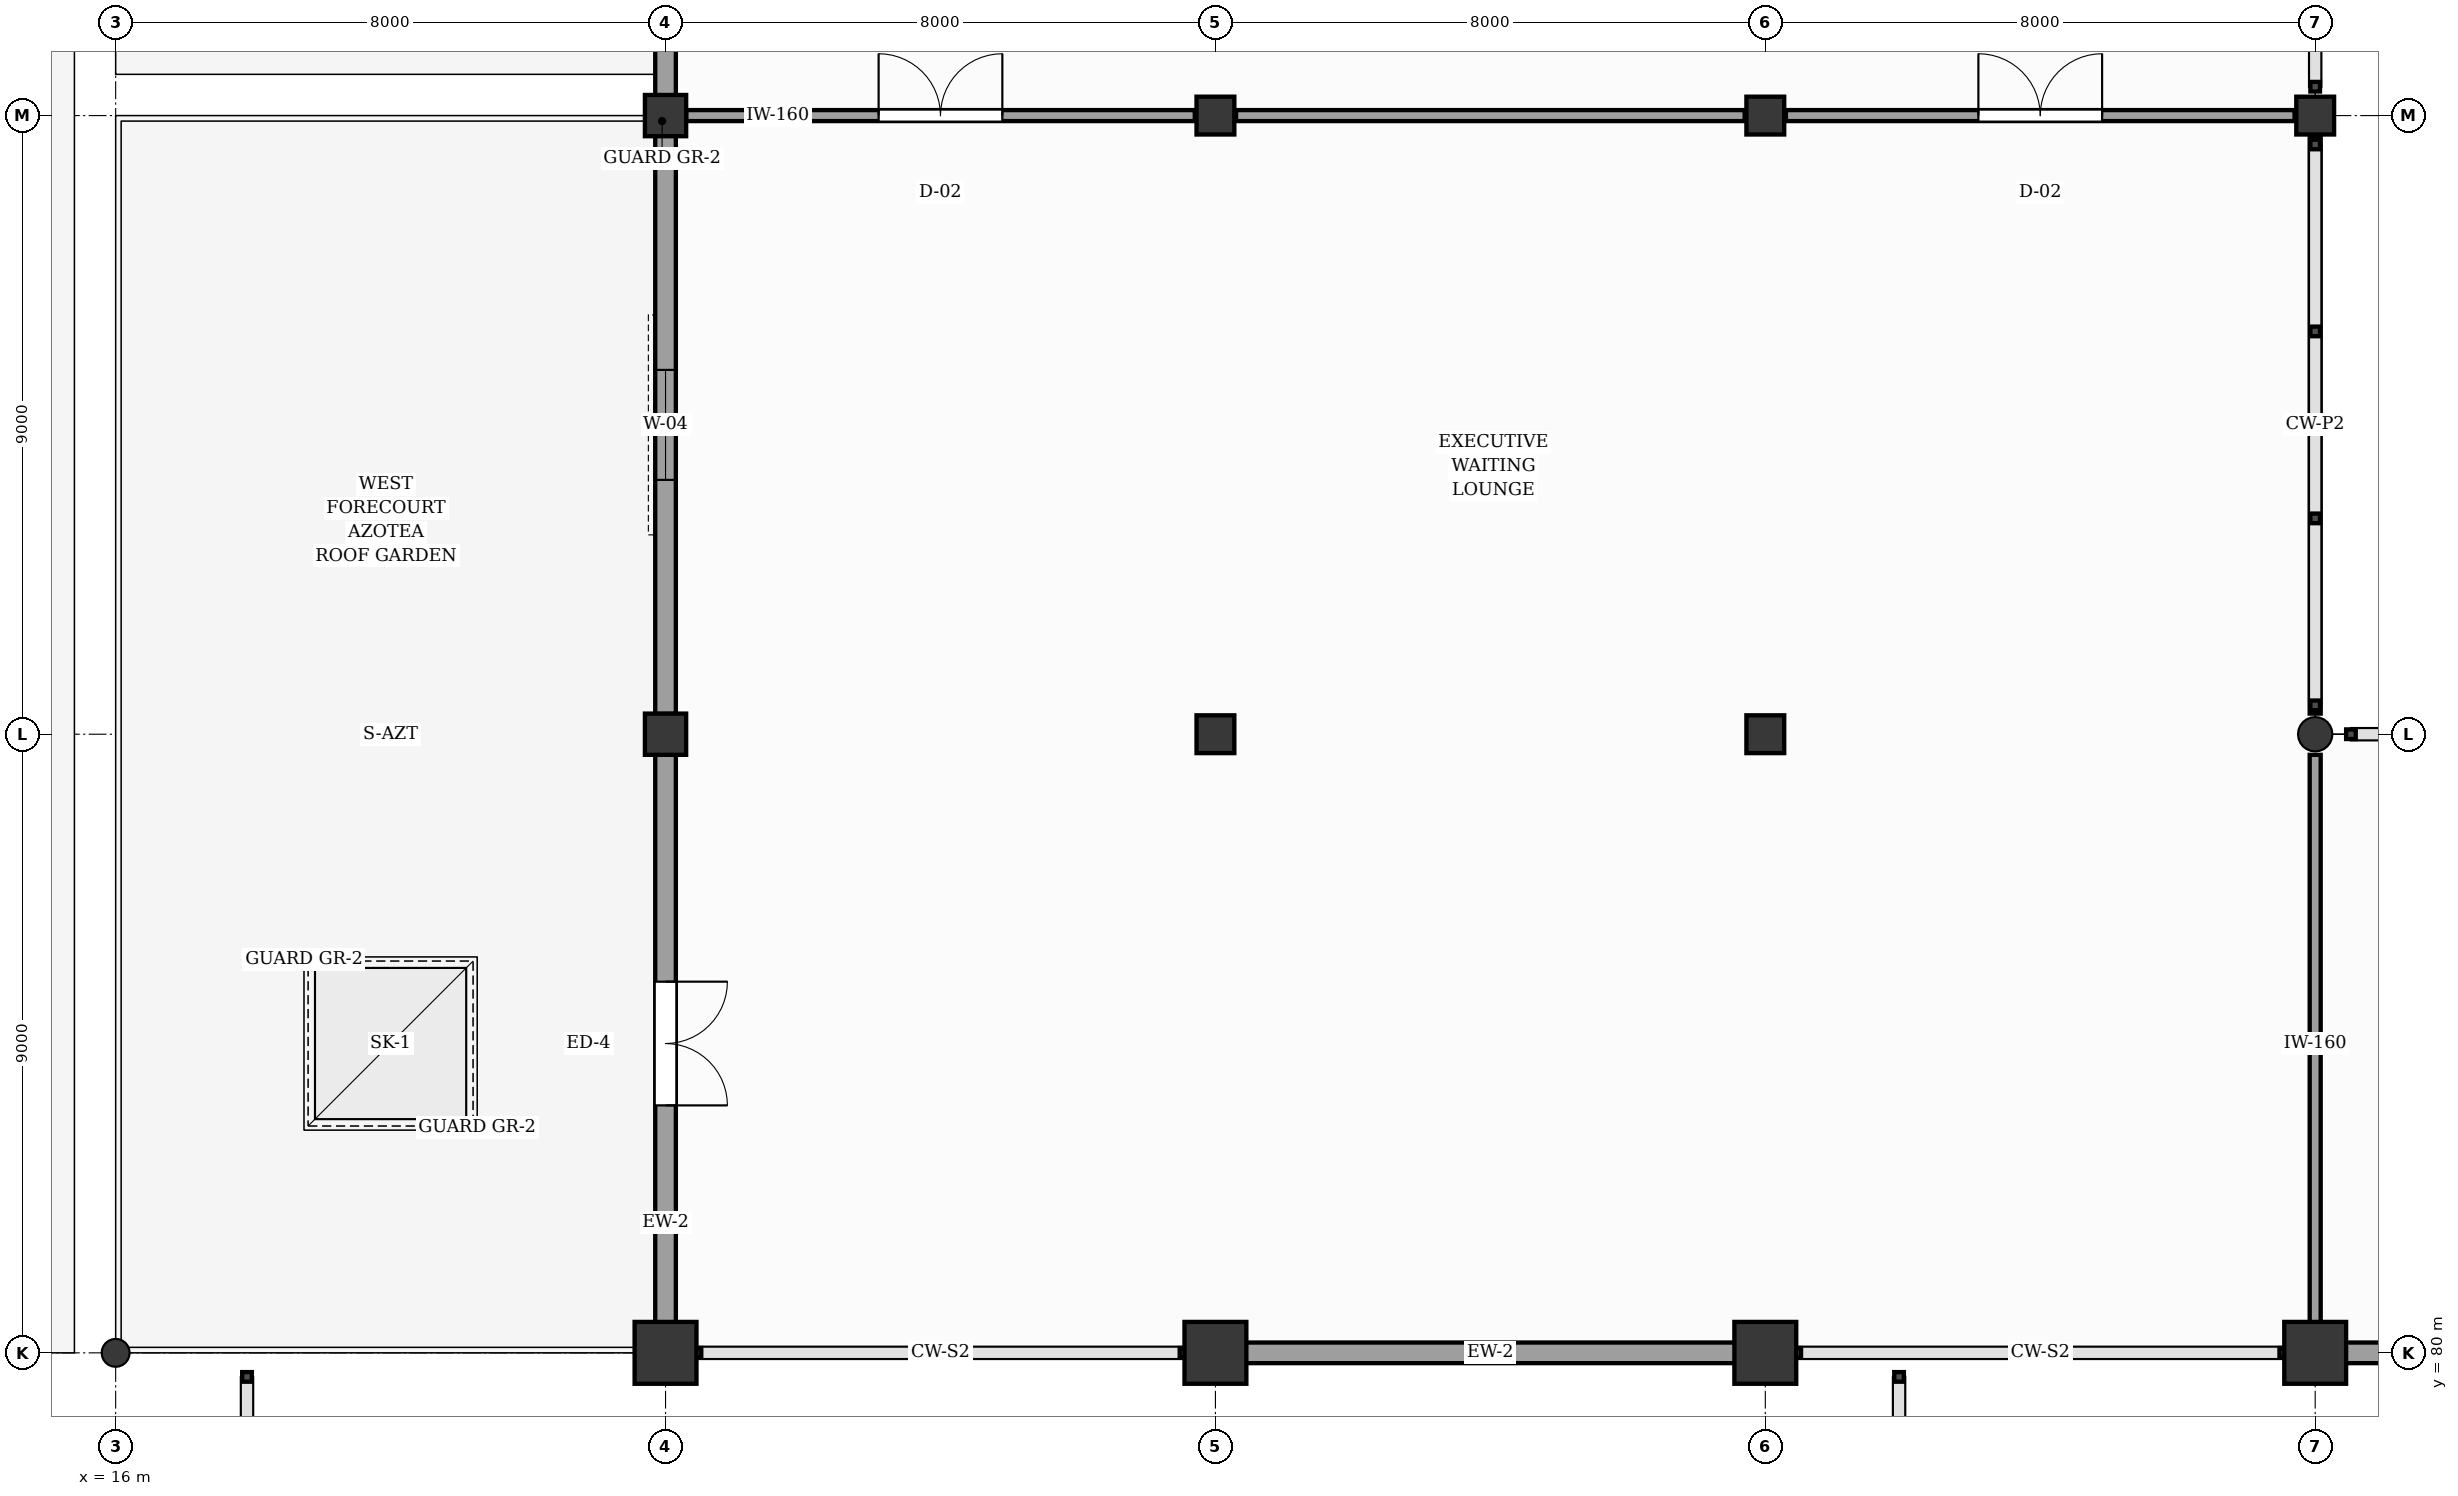
"""IFC4 building model, lengths in metres.
Left out: names, types, materials, properties, quantities, classifications, styles, units other than length and angle.
Written with IfcOpenShell. Run it as: python <this file> out.ifc"""

import sys

from ifc_helpers import new_model, si_unit, direction, frame, frame_2d, origin, origin_2d, place, context, subcontext, project, spatial, rectangle, circle, hollow_circle, extrude, element, fill, save


model = new_model("IFC4")
c1 = context("Model", 3, precision=1e-05, world=origin(), true_north=direction((0.0, 1.0)))
c2 = subcontext(c1, "Body", "Model", "MODEL_VIEW")
j1 = project(units=[si_unit("LENGTHUNIT", "METRE"), si_unit("PLANEANGLEUNIT", "RADIAN")], contexts=[c1])
p1 = place(None, origin())
s1 = spatial("IfcSite", under=j1, at=p1, CompositionType="ELEMENT")
p2 = place(p1, origin())
s2 = spatial("IfcBuilding", under=s1, at=p2, CompositionType="ELEMENT")
p3 = place(p2, frame((0.0, 0.0, 9.6)))
s3 = spatial("IfcBuildingStorey", under=s2, at=p3, CompositionType="ELEMENT", Elevation=9.6)
p4 = place(p3, frame((24.0, 80.0, 0.0), z_axis=(0.0, 0.0, 1.0), x_axis=(1.0, 0.0, 0.0)))
e1 = element("IfcColumn", 1, at=p4, inside=s3, PredefinedType="COLUMN", context=c2, shape_type="SweptSolid", body=[
    extrude(rectangle(XDim=0.9, YDim=0.9, at=origin_2d()), origin(), (0.0, 0.0, 1.0), 6.6),
])
for number, where, z_axis, x_axis in (
    (2, (24.0, 89.0, 0.0), (0.0, 0.0, 1.0), (1.0, 0.0, 0.0)),
    (3, (24.0, 98.0, 0.0), (0.0, 0.0, 1.0), (1.0, 0.0, 0.0)),
):
    element("IfcColumn", number, at=place(p3, frame(where, z_axis=z_axis, x_axis=x_axis)), inside=s3, PredefinedType="COLUMN", context=c2, shape_type="SweptSolid", body=[
        extrude(rectangle(XDim=0.6, YDim=0.6, at=origin_2d()), origin(), (0.0, 0.0, 1.0), 6.6),
    ])
p5 = place(p3, frame((32.0, 80.0, 0.0), z_axis=(0.0, 0.0, 1.0), x_axis=(1.0, 0.0, 0.0)))
e4 = element("IfcColumn", 4, at=p5, inside=s3, PredefinedType="COLUMN", context=c2, shape_type="SweptSolid", body=[
    extrude(rectangle(XDim=0.9, YDim=0.9, at=origin_2d()), origin(), (0.0, 0.0, 1.0), 6.6),
])
for number, where, z_axis, x_axis in (
    (5, (32.0, 89.0, 0.0), (0.0, 0.0, 1.0), (1.0, 0.0, 0.0)),
    (6, (32.0, 98.0, 0.0), (0.0, 0.0, 1.0), (1.0, 0.0, 0.0)),
):
    element("IfcColumn", number, at=place(p3, frame(where, z_axis=z_axis, x_axis=x_axis)), inside=s3, PredefinedType="COLUMN", context=c2, shape_type="SweptSolid", body=[
        extrude(rectangle(XDim=0.55, YDim=0.55, at=origin_2d()), origin(), (0.0, 0.0, 1.0), 6.6),
    ])
p6 = place(p3, frame((40.0, 80.0, 0.0), z_axis=(0.0, 0.0, 1.0), x_axis=(1.0, 0.0, 0.0)))
e7 = element("IfcColumn", 7, at=p6, inside=s3, PredefinedType="COLUMN", context=c2, shape_type="SweptSolid", body=[
    extrude(rectangle(XDim=0.9, YDim=0.9, at=origin_2d()), origin(), (0.0, 0.0, 1.0), 6.6),
])
for number, where, z_axis, x_axis in (
    (8, (40.0, 89.0, 0.0), (0.0, 0.0, 1.0), (1.0, 0.0, 0.0)),
    (9, (40.0, 98.0, 0.0), (0.0, 0.0, 1.0), (1.0, 0.0, 0.0)),
):
    element("IfcColumn", number, at=place(p3, frame(where, z_axis=z_axis, x_axis=x_axis)), inside=s3, PredefinedType="COLUMN", context=c2, shape_type="SweptSolid", body=[
        extrude(rectangle(XDim=0.55, YDim=0.55, at=origin_2d()), origin(), (0.0, 0.0, 1.0), 6.6),
    ])
p7 = place(p3, frame((48.0, 80.0, 0.0), z_axis=(0.0, 0.0, 1.0), x_axis=(1.0, 0.0, 0.0)))
e10 = element("IfcColumn", 10, at=p7, inside=s3, PredefinedType="COLUMN", context=c2, shape_type="SweptSolid", body=[
    extrude(rectangle(XDim=0.9, YDim=0.9, at=origin_2d()), origin(), (0.0, 0.0, 1.0), 6.6),
])
p8 = place(p3, frame((48.0, 89.0, 0.0), z_axis=(0.0, 0.0, 1.0), x_axis=(1.0, 0.0, 0.0)))
e11 = element("IfcColumn", 11, at=p8, inside=s3, PredefinedType="COLUMN", context=c2, shape_type="SweptSolid", body=[
    extrude(circle(Radius=0.25, at=origin_2d()), origin(), (0.0, 0.0, 1.0), 6.6),
])
p9 = place(p3, frame((48.0, 98.0, 0.0), z_axis=(0.0, 0.0, 1.0), x_axis=(1.0, 0.0, 0.0)))
e12 = element("IfcColumn", 12, at=p9, inside=s3, PredefinedType="COLUMN", context=c2, shape_type="SweptSolid", body=[
    extrude(rectangle(XDim=0.55, YDim=0.55, at=origin_2d()), origin(), (0.0, 0.0, 1.0), 6.6),
])
p10 = place(p3, frame((16.0, 80.0, 0.0), z_axis=(0.0, 0.0, 1.0), x_axis=(1.0, 0.0, 0.0)))
e13 = element("IfcColumn", 13, at=p10, inside=s3, PredefinedType="COLUMN", context=c2, shape_type="SweptSolid", body=[
    extrude(hollow_circle(Radius=0.203, WallThickness=0.016, at=origin_2d()), origin(), (0.0, 0.0, 1.0), 3.0),
])
for number, where, z_axis, x_axis in (
    (14, (32.345, 80.0, 0.0), (0.0, 0.0, 1.0), (1.0, 0.0, 0.0)),
    (15, (48.345, 80.0, 0.0), (0.0, 0.0, 1.0), (1.0, 0.0, 0.0)),
):
    element("IfcWall", number, at=place(p3, frame(where, z_axis=z_axis, x_axis=x_axis)), inside=s3, PredefinedType="SOLIDWALL", context=c2, shape_type="SweptSolid", body=[
        extrude(rectangle(XDim=7.31, YDim=0.3, at=frame_2d((3.655, 0.0))), origin(), (0.0, 0.0, 1.0), 2.27),
    ])
p11 = place(p3, frame((24.0, 80.4, 0.0), z_axis=(0.0, 0.0, 1.0), x_axis=(0.0, 1.0, 0.0)))
e16 = element("IfcWall", 16, at=p11, inside=s3, PredefinedType="SOLIDWALL", context=c2, shape_type="SweptSolid", body=[
    extrude(rectangle(XDim=8.305, YDim=0.3, at=frame_2d((4.153, 0.0))), origin(), (0.0, 0.0, 1.0), 5.36),
])
p12 = place(p11, frame((3.2, 0.0, 0.0)))
e17 = element("IfcOpeningElement", 17, at=p12, cuts=e16, PredefinedType="OPENING", context=c2, shape_type="SweptSolid", body=[
    extrude(rectangle(XDim=1.8, YDim=2.2, at=frame_2d((0.9, 1.1))), frame((0.0, 0.16, 0.0), z_axis=(0.0, -1.0, 0.0), x_axis=(1.0, 0.0, 0.0)), (0.0, 0.0, 1.0), 0.32),
])
p13 = place(p3, frame((24.0, 89.295, 0.0), z_axis=(0.0, 0.0, 1.0), x_axis=(0.0, 1.0, 0.0)))
e18 = element("IfcWall", 18, at=p13, inside=s3, PredefinedType="SOLIDWALL", context=c2, shape_type="SweptSolid", body=[
    extrude(rectangle(XDim=8.41, YDim=0.3, at=frame_2d((4.205, 0.0))), origin(), (0.0, 0.0, 1.0), 5.64),
])
p14 = place(p13, frame((3.405, 0.0, 0.95)))
e19 = element("IfcOpeningElement", 19, at=p14, cuts=e18, PredefinedType="OPENING", context=c2, shape_type="SweptSolid", body=[
    extrude(rectangle(XDim=1.6, YDim=2.1, at=frame_2d((0.8, 1.05))), frame((0.0, 0.16, 0.0), z_axis=(0.0, -1.0, 0.0), x_axis=(1.0, 0.0, 0.0)), (0.0, 0.0, 1.0), 0.32),
])
p15 = place(p3, frame((24.0, 98.295, 0.0), z_axis=(0.0, 0.0, 1.0), x_axis=(0.0, 1.0, 0.0)))
e20 = element("IfcWall", 20, at=p15, inside=s3, PredefinedType="SOLIDWALL", context=c2, shape_type="SweptSolid", body=[
    extrude(rectangle(XDim=8.41, YDim=0.3, at=frame_2d((4.205, 0.0))), origin(), (0.0, 0.0, 1.0), 5.64),
])
p16 = place(p15, frame((3.405, 0.0, 0.95)))
e21 = element("IfcOpeningElement", 21, at=p16, cuts=e20, PredefinedType="OPENING", context=c2, shape_type="SweptSolid", body=[
    extrude(rectangle(XDim=1.6, YDim=2.1, at=frame_2d((0.8, 1.05))), frame((0.0, 0.16, 0.0), z_axis=(0.0, -1.0, 0.0), x_axis=(1.0, 0.0, 0.0)), (0.0, 0.0, 1.0), 0.32),
])
p17 = place(p3, frame((24.3, 98.0, 0.0), z_axis=(0.0, 0.0, 1.0), x_axis=(1.0, 0.0, 0.0)))
e22 = element("IfcWall", 22, at=p17, inside=s3, PredefinedType="PARTITIONING", context=c2, shape_type="SweptSolid", body=[
    extrude(rectangle(XDim=7.4, YDim=0.16, at=frame_2d((3.7, 0.0))), origin(), (0.0, 0.0, 1.0), 5.5),
])
p18 = place(p17, frame((2.8, 0.0, 0.0)))
e23 = element("IfcOpeningElement", 23, at=p18, cuts=e22, PredefinedType="OPENING", context=c2, shape_type="SweptSolid", body=[
    extrude(rectangle(XDim=1.8, YDim=2.25, at=frame_2d((0.9, 1.125))), frame((0.0, 0.09, 0.0), z_axis=(0.0, -1.0, 0.0), x_axis=(1.0, 0.0, 0.0)), (0.0, 0.0, 1.0), 0.18),
])
p19 = place(p3, frame((32.3, 98.0, 0.0), z_axis=(0.0, 0.0, 1.0), x_axis=(1.0, 0.0, 0.0)))
e24 = element("IfcWall", 24, at=p19, inside=s3, PredefinedType="PARTITIONING", context=c2, shape_type="SweptSolid", body=[
    extrude(rectangle(XDim=7.4, YDim=0.16, at=frame_2d((3.7, 0.0))), origin(), (0.0, 0.0, 1.0), 5.5),
])
p20 = place(p3, frame((40.3, 98.0, 0.0), z_axis=(0.0, 0.0, 1.0), x_axis=(1.0, 0.0, 0.0)))
e25 = element("IfcWall", 25, at=p20, inside=s3, PredefinedType="PARTITIONING", context=c2, shape_type="SweptSolid", body=[
    extrude(rectangle(XDim=7.4, YDim=0.16, at=frame_2d((3.7, 0.0))), origin(), (0.0, 0.0, 1.0), 5.5),
])
p21 = place(p20, frame((2.8, 0.0, 0.0)))
e26 = element("IfcOpeningElement", 26, at=p21, cuts=e25, PredefinedType="OPENING", context=c2, shape_type="SweptSolid", body=[
    extrude(rectangle(XDim=1.8, YDim=2.25, at=frame_2d((0.9, 1.125))), frame((0.0, 0.09, 0.0), z_axis=(0.0, -1.0, 0.0), x_axis=(1.0, 0.0, 0.0)), (0.0, 0.0, 1.0), 0.18),
])
p22 = place(p3, frame((48.0, 80.3, 0.0), z_axis=(0.0, 0.0, 1.0), x_axis=(0.0, 1.0, 0.0)))
e27 = element("IfcWall", 27, at=p22, inside=s3, PredefinedType="PARTITIONING", context=c2, shape_type="SweptSolid", body=[
    extrude(rectangle(XDim=8.4, YDim=0.16, at=frame_2d((4.2, 0.0))), origin(), (0.0, 0.0, 1.0), 5.36),
])
p23 = place(p3, frame((48.0, 89.3, 0.0), z_axis=(0.0, 0.0, 1.0), x_axis=(0.0, 1.0, 0.0)))
e28 = element("IfcWall", 28, at=p23, inside=s3, PredefinedType="PARTITIONING", context=c2, shape_type="SweptSolid", body=[
    extrude(rectangle(XDim=8.4, YDim=0.16, at=frame_2d((4.2, 0.0))), origin(), (0.0, 0.0, 1.0), 5.5),
])
p24 = place(p12, frame((1.8, 0.0, 0.0), z_axis=(0.0, 0.0, 1.0), x_axis=(-1.0, 0.0, 0.0)))
e29 = element("IfcDoor", 29, at=p24, inside=s3, OperationType="DOUBLE_DOOR_SINGLE_SWING", PredefinedType="DOOR", context=c2, shape_type="SweptSolid", body=[
    extrude(rectangle(XDim=1.8, YDim=2.2, at=frame_2d((0.9, 1.1))), frame((0.0, 0.025, 0.0), z_axis=(0.0, -1.0, 0.0), x_axis=(1.0, 0.0, 0.0)), (0.0, 0.0, 1.0), 0.05),
])
fill(e17, e29)
p25 = place(p14, origin())
e30 = element("IfcWindow", 30, at=p25, inside=s3, PartitioningType="SINGLE_PANEL", PredefinedType="WINDOW", context=c2, shape_type="SweptSolid", body=[
    extrude(rectangle(XDim=1.6, YDim=2.1, at=frame_2d((0.8, 1.05))), frame((0.0, 0.03, 0.0), z_axis=(0.0, -1.0, 0.0), x_axis=(1.0, 0.0, 0.0)), (0.0, 0.0, 1.0), 0.06),
])
fill(e19, e30)
p26 = place(p3, frame((0.0, 0.0, -0.25)))
p27 = place(p26, frame((20.0, 84.5, 0.0)))
p28 = place(p27, frame((0.0, 0.0, 0.2)))
e31 = element("IfcWindow", 31, at=p28, inside=s3, PartitioningType="SINGLE_PANEL", PredefinedType="SKYLIGHT", context=c2, shape_type="SweptSolid", body=[
    extrude(rectangle(XDim=2.2, YDim=2.2, at=origin_2d()), origin(), (0.0, 0.0, 1.0), 0.05),
])
p29 = place(p18, origin())
e32 = element("IfcDoor", 32, at=p29, inside=s3, OperationType="DOUBLE_DOOR_SINGLE_SWING", PredefinedType="DOOR", context=c2, shape_type="SweptSolid", body=[
    extrude(rectangle(XDim=1.8, YDim=2.25, at=frame_2d((0.9, 1.125))), frame((0.0, 0.025, 0.0), z_axis=(0.0, -1.0, 0.0), x_axis=(1.0, 0.0, 0.0)), (0.0, 0.0, 1.0), 0.05),
])
fill(e23, e32)
p30 = place(p21, origin())
e33 = element("IfcDoor", 33, at=p30, inside=s3, OperationType="DOUBLE_DOOR_SINGLE_SWING", PredefinedType="DOOR", context=c2, shape_type="SweptSolid", body=[
    extrude(rectangle(XDim=1.8, YDim=2.25, at=frame_2d((0.9, 1.125))), frame((0.0, 0.025, 0.0), z_axis=(0.0, -1.0, 0.0), x_axis=(1.0, 0.0, 0.0)), (0.0, 0.0, 1.0), 0.05),
])
fill(e26, e33)
save(model, sys.argv[1])
